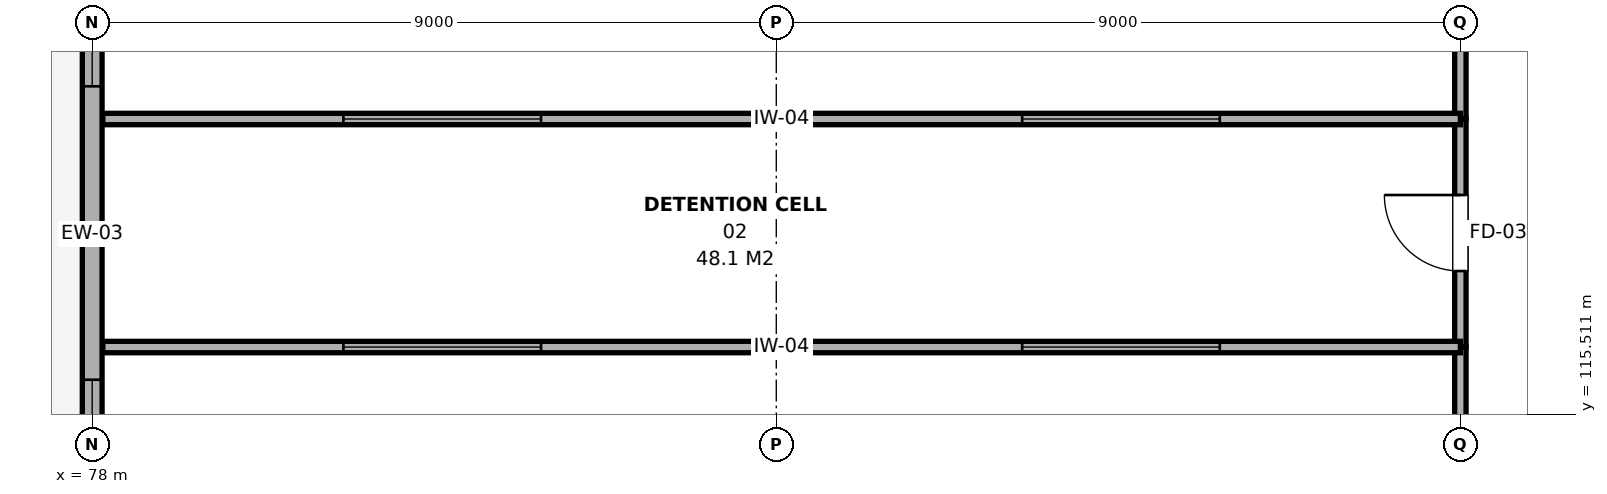
"""IFC4 building model, lengths in metres.
Left out: names, types, materials, properties, quantities, classifications, styles, units other than length and angle.
Written with IfcOpenShell. Run it as: python <this file> out.ifc"""

import sys

from ifc_helpers import new_model, si_unit, direction, frame, frame_2d, origin, place, context, subcontext, project, spatial, rectangle, extrude, element, fill, save


model = new_model("IFC4")
c1 = context("Model", 3, precision=1e-05, world=origin(), true_north=direction((0.0, 1.0)))
c2 = subcontext(c1, "Body", "Model", "MODEL_VIEW")
j1 = project(units=[si_unit("LENGTHUNIT", "METRE"), si_unit("PLANEANGLEUNIT", "RADIAN")], contexts=[c1])
p1 = place(None, origin())
s1 = spatial("IfcSite", under=j1, at=p1, CompositionType="ELEMENT")
p2 = place(p1, origin())
s2 = spatial("IfcBuilding", under=s1, at=p2, CompositionType="ELEMENT")
p3 = place(p2, origin())
s3 = spatial("IfcBuildingStorey", under=s2, at=p3, CompositionType="ELEMENT", Elevation=0.0)
p4 = place(p3, frame((78.0, 113.4, 0.0), z_axis=(0.0, 0.0, 1.0), x_axis=(0.0, 1.0, 0.0)))
e1 = element("IfcWall", 1, at=p4, inside=s3, PredefinedType="SOLIDWALL", context=c2, shape_type="SweptSolid", body=[
    extrude(rectangle(XDim=9.0, YDim=0.26, at=frame_2d((4.5, 0.0))), origin(), (0.0, 0.0, 1.0), 3.965),
])
p5 = place(p4, frame((0.57, 0.0, 1.05)))
e2 = element("IfcOpeningElement", 2, at=p5, cuts=e1, PredefinedType="OPENING", context=c2, shape_type="SweptSolid", body=[
    extrude(rectangle(XDim=2.0, YDim=1.8, at=frame_2d((1.0, 0.9))), frame((0.0, 0.145, 0.0), z_axis=(0.0, -1.0, 0.0), x_axis=(1.0, 0.0, 0.0)), (0.0, 0.0, 1.0), 0.29),
])
p6 = place(p4, frame((6.43, 0.0, 1.05)))
e3 = element("IfcOpeningElement", 3, at=p6, cuts=e1, PredefinedType="OPENING", context=c2, shape_type="SweptSolid", body=[
    extrude(rectangle(XDim=2.0, YDim=1.8, at=frame_2d((1.0, 0.9))), frame((0.0, 0.145, 0.0), z_axis=(0.0, -1.0, 0.0), x_axis=(1.0, 0.0, 0.0)), (0.0, 0.0, 1.0), 0.29),
])
p7 = place(p3, frame((96.0, 113.4, 0.0), z_axis=(0.0, 0.0, 1.0), x_axis=(0.0, 1.0, 0.0)))
e4 = element("IfcWall", 4, at=p7, inside=s3, PredefinedType="PARTITIONING", context=c2, shape_type="SweptSolid", body=[
    extrude(rectangle(XDim=3.0, YDim=0.15, at=frame_2d((1.5, 0.0))), origin(), (0.0, 0.0, 1.0), 4.165),
])
p8 = place(p7, frame((1.0, 0.0, 0.0)))
e5 = element("IfcOpeningElement", 5, at=p8, cuts=e4, PredefinedType="OPENING", context=c2, shape_type="SweptSolid", body=[
    extrude(rectangle(XDim=1.0, YDim=2.15, at=frame_2d((0.5, 1.075))), frame((0.0, 0.09, 0.0), z_axis=(0.0, -1.0, 0.0), x_axis=(1.0, 0.0, 0.0)), (0.0, 0.0, 1.0), 0.18),
])
p9 = place(p3, frame((96.0, 116.4, 0.0), z_axis=(0.0, 0.0, 1.0), x_axis=(0.0, 1.0, 0.0)))
e6 = element("IfcWall", 6, at=p9, inside=s3, PredefinedType="PARTITIONING", context=c2, shape_type="SweptSolid", body=[
    extrude(rectangle(XDim=3.0, YDim=0.15, at=frame_2d((1.5, 0.0))), origin(), (0.0, 0.0, 1.0), 4.205),
])
p10 = place(p9, frame((1.0, 0.0, 0.0)))
e7 = element("IfcOpeningElement", 7, at=p10, cuts=e6, PredefinedType="OPENING", context=c2, shape_type="SweptSolid", body=[
    extrude(rectangle(XDim=1.0, YDim=2.15, at=frame_2d((0.5, 1.075))), frame((0.0, 0.09, 0.0), z_axis=(0.0, -1.0, 0.0), x_axis=(1.0, 0.0, 0.0)), (0.0, 0.0, 1.0), 0.18),
])
p11 = place(p3, frame((78.14, 116.4, 0.0), z_axis=(0.0, 0.0, 1.0), x_axis=(1.0, 0.0, 0.0)))
e8 = element("IfcWall", 8, at=p11, inside=s3, PredefinedType="PARTITIONING", context=c2, shape_type="SweptSolid", body=[
    extrude(rectangle(XDim=17.86, YDim=0.15, at=frame_2d((8.93, 0.0))), origin(), (0.0, 0.0, 1.0), 4.065),
])
p12 = place(p11, frame((3.165, 0.0, 0.95)))
e9 = element("IfcOpeningElement", 9, at=p12, cuts=e8, PredefinedType="OPENING", context=c2, shape_type="SweptSolid", body=[
    extrude(rectangle(XDim=2.6, YDim=1.5, at=frame_2d((1.3, 0.75))), frame((0.0, 0.09, 0.0), z_axis=(0.0, -1.0, 0.0), x_axis=(1.0, 0.0, 0.0)), (0.0, 0.0, 1.0), 0.18),
])
p13 = place(p11, frame((12.095, 0.0, 0.95)))
e10 = element("IfcOpeningElement", 10, at=p13, cuts=e8, PredefinedType="OPENING", context=c2, shape_type="SweptSolid", body=[
    extrude(rectangle(XDim=2.6, YDim=1.5, at=frame_2d((1.3, 0.75))), frame((0.0, 0.09, 0.0), z_axis=(0.0, -1.0, 0.0), x_axis=(1.0, 0.0, 0.0)), (0.0, 0.0, 1.0), 0.18),
])
p14 = place(p3, frame((96.0, 119.4, 0.0), z_axis=(0.0, 0.0, 1.0), x_axis=(0.0, 1.0, 0.0)))
e11 = element("IfcWall", 11, at=p14, inside=s3, PredefinedType="PARTITIONING", context=c2, shape_type="SweptSolid", body=[
    extrude(rectangle(XDim=3.0, YDim=0.15, at=frame_2d((1.5, 0.0))), origin(), (0.0, 0.0, 1.0), 3.965),
])
p15 = place(p14, frame((1.0, 0.0, 0.0)))
e12 = element("IfcOpeningElement", 12, at=p15, cuts=e11, PredefinedType="OPENING", context=c2, shape_type="SweptSolid", body=[
    extrude(rectangle(XDim=1.0, YDim=2.15, at=frame_2d((0.5, 1.075))), frame((0.0, 0.09, 0.0), z_axis=(0.0, -1.0, 0.0), x_axis=(1.0, 0.0, 0.0)), (0.0, 0.0, 1.0), 0.18),
])
p16 = place(p3, frame((78.14, 119.4, 0.0), z_axis=(0.0, 0.0, 1.0), x_axis=(1.0, 0.0, 0.0)))
e13 = element("IfcWall", 13, at=p16, inside=s3, PredefinedType="PARTITIONING", context=c2, shape_type="SweptSolid", body=[
    extrude(rectangle(XDim=17.86, YDim=0.15, at=frame_2d((8.93, 0.0))), origin(), (0.0, 0.0, 1.0), 4.065),
])
p17 = place(p16, frame((3.165, 0.0, 0.95)))
e14 = element("IfcOpeningElement", 14, at=p17, cuts=e13, PredefinedType="OPENING", context=c2, shape_type="SweptSolid", body=[
    extrude(rectangle(XDim=2.6, YDim=1.5, at=frame_2d((1.3, 0.75))), frame((0.0, 0.09, 0.0), z_axis=(0.0, -1.0, 0.0), x_axis=(1.0, 0.0, 0.0)), (0.0, 0.0, 1.0), 0.18),
])
p18 = place(p16, frame((12.095, 0.0, 0.95)))
e15 = element("IfcOpeningElement", 15, at=p18, cuts=e13, PredefinedType="OPENING", context=c2, shape_type="SweptSolid", body=[
    extrude(rectangle(XDim=2.6, YDim=1.5, at=frame_2d((1.3, 0.75))), frame((0.0, 0.09, 0.0), z_axis=(0.0, -1.0, 0.0), x_axis=(1.0, 0.0, 0.0)), (0.0, 0.0, 1.0), 0.18),
])
p19 = place(p5, origin())
e16 = element("IfcWindow", 16, at=p19, inside=s3, PartitioningType="SINGLE_PANEL", PredefinedType="WINDOW", context=c2, shape_type="SweptSolid", body=[
    extrude(rectangle(XDim=2.0, YDim=1.8, at=frame_2d((1.0, 0.9))), frame((0.0, 0.03, 0.0), z_axis=(0.0, -1.0, 0.0), x_axis=(1.0, 0.0, 0.0)), (0.0, 0.0, 1.0), 0.06),
])
fill(e2, e16)
p20 = place(p6, origin())
e17 = element("IfcWindow", 17, at=p20, inside=s3, PartitioningType="SINGLE_PANEL", PredefinedType="WINDOW", context=c2, shape_type="SweptSolid", body=[
    extrude(rectangle(XDim=2.0, YDim=1.8, at=frame_2d((1.0, 0.9))), frame((0.0, 0.03, 0.0), z_axis=(0.0, -1.0, 0.0), x_axis=(1.0, 0.0, 0.0)), (0.0, 0.0, 1.0), 0.06),
])
fill(e3, e17)
p21 = place(p10, origin())
e18 = element("IfcDoor", 18, at=p21, inside=s3, OperationType="SINGLE_SWING_RIGHT", PredefinedType="DOOR", context=c2, shape_type="SweptSolid", body=[
    extrude(rectangle(XDim=1.0, YDim=2.15, at=frame_2d((0.5, 1.075))), frame((0.0, 0.025, 0.0), z_axis=(0.0, -1.0, 0.0), x_axis=(1.0, 0.0, 0.0)), (0.0, 0.0, 1.0), 0.05),
])
fill(e7, e18)
p22 = place(p12, origin())
e19 = element("IfcWindow", 19, at=p22, inside=s3, PartitioningType="SINGLE_PANEL", PredefinedType="WINDOW", context=c2, shape_type="SweptSolid", body=[
    extrude(rectangle(XDim=2.6, YDim=1.5, at=frame_2d((1.3, 0.75))), frame((0.0, 0.03, 0.0), z_axis=(0.0, -1.0, 0.0), x_axis=(1.0, 0.0, 0.0)), (0.0, 0.0, 1.0), 0.06),
])
fill(e9, e19)
p23 = place(p13, origin())
e20 = element("IfcWindow", 20, at=p23, inside=s3, PartitioningType="SINGLE_PANEL", PredefinedType="WINDOW", context=c2, shape_type="SweptSolid", body=[
    extrude(rectangle(XDim=2.6, YDim=1.5, at=frame_2d((1.3, 0.75))), frame((0.0, 0.03, 0.0), z_axis=(0.0, -1.0, 0.0), x_axis=(1.0, 0.0, 0.0)), (0.0, 0.0, 1.0), 0.06),
])
fill(e10, e20)
p24 = place(p17, origin())
e21 = element("IfcWindow", 21, at=p24, inside=s3, PartitioningType="SINGLE_PANEL", PredefinedType="WINDOW", context=c2, shape_type="SweptSolid", body=[
    extrude(rectangle(XDim=2.6, YDim=1.5, at=frame_2d((1.3, 0.75))), frame((0.0, 0.03, 0.0), z_axis=(0.0, -1.0, 0.0), x_axis=(1.0, 0.0, 0.0)), (0.0, 0.0, 1.0), 0.06),
])
fill(e14, e21)
p25 = place(p18, origin())
e22 = element("IfcWindow", 22, at=p25, inside=s3, PartitioningType="SINGLE_PANEL", PredefinedType="WINDOW", context=c2, shape_type="SweptSolid", body=[
    extrude(rectangle(XDim=2.6, YDim=1.5, at=frame_2d((1.3, 0.75))), frame((0.0, 0.03, 0.0), z_axis=(0.0, -1.0, 0.0), x_axis=(1.0, 0.0, 0.0)), (0.0, 0.0, 1.0), 0.06),
])
fill(e15, e22)
save(model, sys.argv[1])
